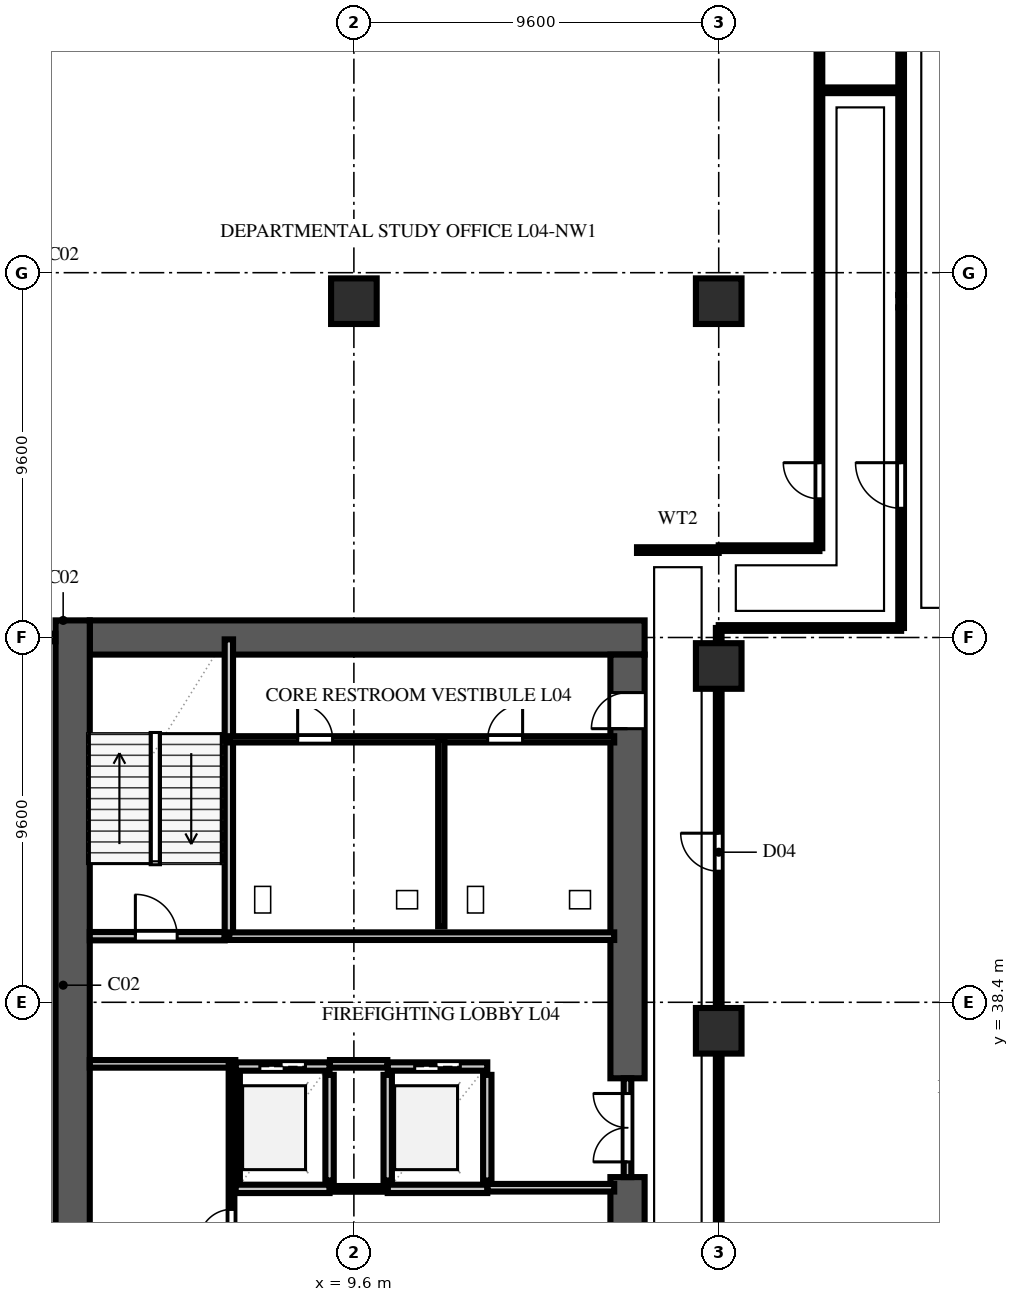
"""IFC4 building model, lengths in metres.
Left out: names, types, materials, properties, quantities, classifications, styles, units other than length and angle.
Written with IfcOpenShell. Run it as: python <this file> out.ifc"""

import sys

from ifc_helpers import new_model, si_unit, direction, frame, frame_2d, origin, origin_2d, place, context, subcontext, project, spatial, rectangle, extrude, element, fill, save


model = new_model("IFC4")
c1 = context("Model", 3, precision=1e-05, world=origin(), true_north=direction((0.0, 1.0)))
c2 = subcontext(c1, "Body", "Model", "MODEL_VIEW")
j1 = project(units=[si_unit("LENGTHUNIT", "METRE"), si_unit("PLANEANGLEUNIT", "RADIAN")], contexts=[c1])
p1 = place(None, origin())
s1 = spatial("IfcSite", under=j1, at=p1, CompositionType="ELEMENT")
p2 = place(p1, origin())
s2 = spatial("IfcBuilding", under=s1, at=p2, CompositionType="ELEMENT")
p3 = place(p2, frame((0.0, 0.0, 19.6)))
s3 = spatial("IfcBuildingStorey", under=s2, at=p3, CompositionType="ELEMENT", Elevation=19.6)
p4 = place(p3, frame((2.65, 48.0, 0.0), z_axis=(0.0, 0.0, 1.0), x_axis=(1.0, 0.0, 0.0)))
e1 = element("IfcWall", 1, at=p4, inside=s3, PredefinedType="SHEAR", context=c2, shape_type="SweptSolid", body=[
    extrude(rectangle(XDim=14.6, YDim=0.9, at=frame_2d((7.3, 0.0))), origin(), (0.0, 0.0, 1.0), 4.34),
])
p5 = place(p3, frame((2.2, 9.15, 0.0), z_axis=(0.0, 0.0, 1.0), x_axis=(0.0, 1.0, 0.0)))
e2 = element("IfcWall", 2, at=p5, inside=s3, PredefinedType="SHEAR", context=c2, shape_type="SweptSolid", body=[
    extrude(rectangle(XDim=39.3, YDim=0.9, at=frame_2d((19.65, 0.0))), origin(), (0.0, 0.0, 1.0), 4.34),
])
p6 = place(p3, frame((16.8, 26.0, 0.0), z_axis=(0.0, 0.0, 1.0), x_axis=(0.0, 1.0, 0.0)))
e3 = element("IfcWall", 3, at=p6, inside=s3, PredefinedType="SHEAR", context=c2, shape_type="SweptSolid", body=[
    extrude(rectangle(XDim=7.8, YDim=0.9, at=frame_2d((3.9, 0.0))), origin(), (0.0, 0.0, 1.0), 4.34),
])
p7 = place(p3, frame((16.8, 36.4, 0.0), z_axis=(0.0, 0.0, 1.0), x_axis=(0.0, 1.0, 0.0)))
e4 = element("IfcWall", 4, at=p7, inside=s3, PredefinedType="SHEAR", context=c2, shape_type="SweptSolid", body=[
    extrude(rectangle(XDim=11.15, YDim=0.9, at=frame_2d((5.575, 0.0))), origin(), (0.0, 0.0, 1.0), 4.34),
])
p8 = place(p7, frame((9.2, 0.0, 0.0)))
e5 = element("IfcOpeningElement", 5, at=p8, cuts=e4, PredefinedType="OPENING", context=c2, shape_type="SweptSolid", body=[
    extrude(rectangle(XDim=0.95, YDim=2.15, at=frame_2d((0.475, 1.075))), frame((0.0, 0.462, 0.0), z_axis=(0.0, -1.0, 0.0), x_axis=(1.0, 0.0, 0.0)), (0.0, 0.0, 1.0), 0.924),
])
for number, where, z_axis, x_axis in (
    (6, (9.6, 56.85, 0.0), (0.0, 0.0, 1.0), (1.0, 0.0, 0.0)),
    (7, (19.2, 37.65, 0.0), (0.0, 0.0, 1.0), (1.0, 0.0, 0.0)),
    (8, (19.2, 47.25, 0.0), (0.0, 0.0, 1.0), (1.0, 0.0, 0.0)),
    (9, (19.2, 56.85, 0.0), (0.0, 0.0, 1.0), (1.0, 0.0, 0.0)),
):
    element("IfcColumn", number, at=place(p3, frame(where, z_axis=z_axis, x_axis=x_axis)), inside=s3, PredefinedType="COLUMN", context=c2, shape_type="SweptSolid", body=[
        extrude(rectangle(XDim=1.2, YDim=1.2, at=origin_2d()), origin(), (0.0, 0.0, 1.0), 4.6),
    ])
p9 = place(p3, frame((2.65, 40.14, 0.0), z_axis=(0.0, 0.0, 1.0), x_axis=(1.0, 0.0, 0.0)))
e10 = element("IfcWall", 10, at=p9, inside=s3, PredefinedType="SOLIDWALL", context=c2, shape_type="SweptSolid", body=[
    extrude(rectangle(XDim=3.55, YDim=0.22, at=frame_2d((1.775, 0.0))), origin(), (0.0, 0.0, 1.0), 4.34),
])
p10 = place(p9, frame((1.2, 0.0, 0.0)))
e11 = element("IfcOpeningElement", 11, at=p10, cuts=e10, PredefinedType="OPENING", context=c2, shape_type="SweptSolid", body=[
    extrude(rectangle(XDim=1.1, YDim=2.2, at=frame_2d((0.55, 1.1))), frame((0.0, 0.122, 0.0), z_axis=(0.0, -1.0, 0.0), x_axis=(1.0, 0.0, 0.0)), (0.0, 0.0, 1.0), 0.244),
])
p11 = place(p3, frame((6.31, 40.14, 0.0), z_axis=(0.0, 0.0, 1.0), x_axis=(0.0, 1.0, 0.0)))
e12 = element("IfcWall", 12, at=p11, inside=s3, PredefinedType="SOLIDWALL", context=c2, shape_type="SweptSolid", body=[
    extrude(rectangle(XDim=7.81, YDim=0.22, at=frame_2d((3.905, 0.0))), origin(), (0.0, 0.0, 1.0), 4.34),
])
for number, where, z_axis, x_axis in (
    (13, (6.49, 33.71, 0.0), (0.0, 0.0, 1.0), (0.0, 1.0, 0.0)),
    (14, (8.96, 33.71, 0.0), (0.0, 0.0, 1.0), (0.0, 1.0, 0.0)),
):
    element("IfcWall", number, at=place(p3, frame(where, z_axis=z_axis, x_axis=x_axis)), inside=s3, PredefinedType="SOLIDWALL", context=c2, shape_type="SweptSolid", body=[
        extrude(rectangle(XDim=2.78, YDim=0.22, at=frame_2d((1.39, 0.0))), origin(), (0.0, 0.0, 1.0), 4.34),
    ])
p12 = place(p3, frame((6.49, 33.49, 0.0), z_axis=(0.0, 0.0, 1.0), x_axis=(1.0, 0.0, 0.0)))
e15 = element("IfcWall", 15, at=p12, inside=s3, PredefinedType="SOLIDWALL", context=c2, shape_type="SweptSolid", body=[
    extrude(rectangle(XDim=2.47, YDim=0.22, at=frame_2d((1.235, 0.0))), origin(), (0.0, 0.0, 1.0), 4.34),
])
p13 = place(p3, frame((6.49, 36.71, 0.0), z_axis=(0.0, 0.0, 1.0), x_axis=(1.0, 0.0, 0.0)))
e16 = element("IfcWall", 16, at=p13, inside=s3, PredefinedType="SOLIDWALL", context=c2, shape_type="SweptSolid", body=[
    extrude(rectangle(XDim=2.47, YDim=0.22, at=frame_2d((1.235, 0.0))), origin(), (0.0, 0.0, 1.0), 4.34),
])
p14 = place(p13, frame((0.635, 0.0, 0.0)))
e17 = element("IfcOpeningElement", 17, at=p14, cuts=e16, PredefinedType="OPENING", context=c2, shape_type="SweptSolid", body=[
    extrude(rectangle(XDim=1.2, YDim=2.2, at=frame_2d((0.6, 1.1))), frame((0.0, 0.122, 0.0), z_axis=(0.0, -1.0, 0.0), x_axis=(1.0, 0.0, 0.0)), (0.0, 0.0, 1.0), 0.244),
])
for number, where, z_axis, x_axis in (
    (18, (10.49, 33.71, 0.0), (0.0, 0.0, 1.0), (0.0, 1.0, 0.0)),
    (19, (13.11, 33.71, 0.0), (0.0, 0.0, 1.0), (0.0, 1.0, 0.0)),
):
    element("IfcWall", number, at=place(p3, frame(where, z_axis=z_axis, x_axis=x_axis)), inside=s3, PredefinedType="SOLIDWALL", context=c2, shape_type="SweptSolid", body=[
        extrude(rectangle(XDim=2.78, YDim=0.22, at=frame_2d((1.39, 0.0))), origin(), (0.0, 0.0, 1.0), 4.34),
    ])
p15 = place(p3, frame((10.49, 33.49, 0.0), z_axis=(0.0, 0.0, 1.0), x_axis=(1.0, 0.0, 0.0)))
e20 = element("IfcWall", 20, at=p15, inside=s3, PredefinedType="SOLIDWALL", context=c2, shape_type="SweptSolid", body=[
    extrude(rectangle(XDim=2.62, YDim=0.22, at=frame_2d((1.31, 0.0))), origin(), (0.0, 0.0, 1.0), 4.34),
])
p16 = place(p3, frame((10.49, 36.71, 0.0), z_axis=(0.0, 0.0, 1.0), x_axis=(1.0, 0.0, 0.0)))
e21 = element("IfcWall", 21, at=p16, inside=s3, PredefinedType="SOLIDWALL", context=c2, shape_type="SweptSolid", body=[
    extrude(rectangle(XDim=2.62, YDim=0.22, at=frame_2d((1.31, 0.0))), origin(), (0.0, 0.0, 1.0), 4.34),
])
p17 = place(p16, frame((0.71, 0.0, 0.0)))
e22 = element("IfcOpeningElement", 22, at=p17, cuts=e21, PredefinedType="OPENING", context=c2, shape_type="SweptSolid", body=[
    extrude(rectangle(XDim=1.2, YDim=2.2, at=frame_2d((0.6, 1.1))), frame((0.0, 0.122, 0.0), z_axis=(0.0, -1.0, 0.0), x_axis=(1.0, 0.0, 0.0)), (0.0, 0.0, 1.0), 0.244),
])
p18 = place(p3, frame((2.65, 36.78, 0.0), z_axis=(0.0, 0.0, 1.0), x_axis=(1.0, 0.0, 0.0)))
e23 = element("IfcWall", 23, at=p18, inside=s3, PredefinedType="SOLIDWALL", context=c2, shape_type="SweptSolid", body=[
    extrude(rectangle(XDim=3.83, YDim=0.2, at=frame_2d((1.915, 0.0))), origin(), (0.0, 0.0, 1.0), 4.34),
])
p19 = place(p3, frame((8.97, 36.78, 0.0), z_axis=(0.0, 0.0, 1.0), x_axis=(1.0, 0.0, 0.0)))
e24 = element("IfcWall", 24, at=p19, inside=s3, PredefinedType="SOLIDWALL", context=c2, shape_type="SweptSolid", body=[
    extrude(rectangle(XDim=1.51, YDim=0.2, at=frame_2d((0.755, 0.0))), origin(), (0.0, 0.0, 1.0), 4.34),
])
p20 = place(p3, frame((13.12, 33.52, 0.0), z_axis=(0.0, 0.0, 1.0), x_axis=(1.0, 0.0, 0.0)))
e25 = element("IfcWall", 25, at=p20, inside=s3, PredefinedType="SOLIDWALL", context=c2, shape_type="SweptSolid", body=[
    extrude(rectangle(XDim=3.33, YDim=0.2, at=frame_2d((1.665, 0.0))), origin(), (0.0, 0.0, 1.0), 4.34),
])
p21 = place(p3, frame((6.32, 40.14, 0.0), z_axis=(0.0, 0.0, 1.0), x_axis=(1.0, 0.0, 0.0)))
e26 = element("IfcWall", 26, at=p21, inside=s3, PredefinedType="SOLIDWALL", context=c2, shape_type="SweptSolid", body=[
    extrude(rectangle(XDim=10.13, YDim=0.2, at=frame_2d((5.065, 0.0))), origin(), (0.0, 0.0, 1.0), 4.34),
])
p22 = place(p3, frame((16.8, 33.8, 0.0), z_axis=(0.0, 0.0, 1.0), x_axis=(0.0, 1.0, 0.0)))
e27 = element("IfcWall", 27, at=p22, inside=s3, PredefinedType="SOLIDWALL", context=c2, shape_type="SweptSolid", body=[
    extrude(rectangle(XDim=2.6, YDim=0.2, at=frame_2d((1.3, 0.0))), origin(), (0.0, 0.0, 1.0), 4.34),
])
p23 = place(p22, frame((0.4, 0.0, 0.0)))
e28 = element("IfcOpeningElement", 28, at=p23, cuts=e27, PredefinedType="OPENING", context=c2, shape_type="SweptSolid", body=[
    extrude(rectangle(XDim=1.8, YDim=2.2, at=frame_2d((0.9, 1.1))), frame((0.0, 0.112, 0.0), z_axis=(0.0, -1.0, 0.0), x_axis=(1.0, 0.0, 0.0)), (0.0, 0.0, 1.0), 0.224),
])
p24 = place(p3, frame((8.965, 33.49, 0.0), z_axis=(0.0, 0.0, 1.0), x_axis=(1.0, 0.0, 0.0)))
e29 = element("IfcWall", 29, at=p24, inside=s3, PredefinedType="PARTITIONING", context=c2, shape_type="SweptSolid", body=[
    extrude(rectangle(XDim=1.52, YDim=0.15, at=frame_2d((0.76, 0.0))), origin(), (0.0, 0.0, 1.0), 4.34),
])
p25 = place(p3, frame((6.38, 17.8, 0.0), z_axis=(0.0, 0.0, 1.0), x_axis=(0.0, 1.0, 0.0)))
e30 = element("IfcWall", 30, at=p25, inside=s3, PredefinedType="PARTITIONING", context=c2, shape_type="SweptSolid", body=[
    extrude(rectangle(XDim=18.98, YDim=0.15, at=frame_2d((9.49, 0.0))), origin(), (0.0, 0.0, 1.0), 4.34),
])
p26 = place(p25, frame((14.3, 0.0, 0.0)))
e31 = element("IfcOpeningElement", 31, at=p26, cuts=e30, PredefinedType="OPENING", context=c2, shape_type="SweptSolid", body=[
    extrude(rectangle(XDim=0.85, YDim=2.1, at=frame_2d((0.425, 1.05))), frame((0.0, 0.087, 0.0), z_axis=(0.0, -1.0, 0.0), x_axis=(1.0, 0.0, 0.0)), (0.0, 0.0, 1.0), 0.174),
])
p27 = place(p3, frame((6.32, 45.32, 0.0), z_axis=(0.0, 0.0, 1.0), x_axis=(1.0, 0.0, 0.0)))
e32 = element("IfcWall", 32, at=p27, inside=s3, PredefinedType="PLUMBINGWALL", context=c2, shape_type="SweptSolid", body=[
    extrude(rectangle(XDim=10.13, YDim=0.165, at=frame_2d((5.065, 0.0))), origin(), (0.0, 0.0, 1.0), 4.34),
])
p28 = place(p27, frame((1.8, 0.0, 0.0)))
e33 = element("IfcOpeningElement", 33, at=p28, cuts=e32, PredefinedType="OPENING", context=c2, shape_type="SweptSolid", body=[
    extrude(rectangle(XDim=0.92, YDim=2.15, at=frame_2d((0.46, 1.075))), frame((0.0, 0.094, 0.0), z_axis=(0.0, -1.0, 0.0), x_axis=(1.0, 0.0, 0.0)), (0.0, 0.0, 1.0), 0.189),
])
p29 = place(p27, frame((6.8, 0.0, 0.0)))
e34 = element("IfcOpeningElement", 34, at=p29, cuts=e32, PredefinedType="OPENING", context=c2, shape_type="SweptSolid", body=[
    extrude(rectangle(XDim=0.92, YDim=2.15, at=frame_2d((0.46, 1.075))), frame((0.0, 0.094, 0.0), z_axis=(0.0, -1.0, 0.0), x_axis=(1.0, 0.0, 0.0)), (0.0, 0.0, 1.0), 0.189),
])
p30 = place(p3, frame((11.9, 40.4, 0.0), z_axis=(0.0, 0.0, 1.0), x_axis=(0.0, 1.0, 0.0)))
e35 = element("IfcWall", 35, at=p30, inside=s3, PredefinedType="PLUMBINGWALL", context=c2, shape_type="SweptSolid", body=[
    extrude(rectangle(XDim=4.92, YDim=0.165, at=frame_2d((2.46, 0.0))), origin(), (0.0, 0.0, 1.0), 4.34),
])
p31 = place(p3, frame((0.85, 48.0, 0.0), z_axis=(0.0, 0.0, 1.0), x_axis=(1.0, 0.0, 0.0)))
e36 = element("IfcWall", 36, at=p31, inside=s3, PredefinedType="SOLIDWALL", context=c2, shape_type="SweptSolid", body=[
    extrude(rectangle(XDim=0.895, YDim=0.2, at=frame_2d((0.448, 0.0))), origin(), (0.0, 0.0, 1.0), 4.34),
])
p32 = place(p3, frame((17.05, 50.3, 0.0), z_axis=(0.0, 0.0, 1.0), x_axis=(1.0, 0.0, 0.0)))
e37 = element("IfcWall", 37, at=p32, inside=s3, PredefinedType="PARTITIONING", context=c2, shape_type="SweptSolid", body=[
    extrude(rectangle(XDim=2.15, YDim=0.15, at=frame_2d((1.075, 0.0))), origin(), (0.0, 0.0, 1.0), 4.34),
])
p33 = place(p3, frame((19.2, 26.25, 0.0), z_axis=(0.0, 0.0, 1.0), x_axis=(0.0, 1.0, 0.0)))
e38 = element("IfcWall", 38, at=p33, inside=s3, PredefinedType="PARTITIONING", context=c2, shape_type="SweptSolid", body=[
    extrude(rectangle(XDim=22.0, YDim=0.15, at=frame_2d((11.0, 0.0))), origin(), (0.0, 0.0, 1.0), 3.724),
])
p34 = place(p33, frame((15.6, 0.0, 0.0)))
e39 = element("IfcOpeningElement", 39, at=p34, cuts=e38, PredefinedType="OPENING", context=c2, shape_type="SweptSolid", body=[
    extrude(rectangle(XDim=1.0, YDim=2.2, at=frame_2d((0.5, 1.1))), frame((0.0, 0.087, 0.0), z_axis=(0.0, -1.0, 0.0), x_axis=(1.0, 0.0, 0.0)), (0.0, 0.0, 1.0), 0.174),
])
p35 = place(p3, frame((19.2, 48.25, 0.0), z_axis=(0.0, 0.0, 1.0), x_axis=(1.0, 0.0, 0.0)))
e40 = element("IfcWall", 40, at=p35, inside=s3, PredefinedType="PARTITIONING", context=c2, shape_type="SweptSolid", body=[
    extrude(rectangle(XDim=4.8, YDim=0.15, at=frame_2d((2.4, 0.0))), origin(), (0.0, 0.0, 1.0), 4.34),
])
p36 = place(p3, frame((19.2, 50.35, 0.0), z_axis=(0.0, 0.0, 1.0), x_axis=(1.0, 0.0, 0.0)))
e41 = element("IfcWall", 41, at=p36, inside=s3, PredefinedType="PARTITIONING", context=c2, shape_type="SweptSolid", body=[
    extrude(rectangle(XDim=2.65, YDim=0.15, at=frame_2d((1.325, 0.0))), origin(), (0.0, 0.0, 1.0), 4.34),
])
p37 = place(p3, frame((21.85, 62.4, 0.0), z_axis=(0.0, 0.0, 1.0), x_axis=(1.0, 0.0, 0.0)))
e42 = element("IfcWall", 42, at=p37, inside=s3, PredefinedType="PARTITIONING", context=c2, shape_type="SweptSolid", body=[
    extrude(rectangle(XDim=2.15, YDim=0.15, at=frame_2d((1.075, 0.0))), origin(), (0.0, 0.0, 1.0), 4.34),
])
p38 = place(p3, frame((24.0, 48.25, 0.0), z_axis=(0.0, 0.0, 1.0), x_axis=(0.0, 1.0, 0.0)))
e43 = element("IfcWall", 43, at=p38, inside=s3, PredefinedType="PARTITIONING", context=c2, shape_type="SweptSolid", body=[
    extrude(rectangle(XDim=8.438, YDim=0.15, at=frame_2d((4.219, 0.0))), origin(), (0.0, 0.0, 1.0), 3.796),
])
p39 = place(p38, frame((3.15, 0.0, 0.0)))
e44 = element("IfcOpeningElement", 44, at=p39, cuts=e43, PredefinedType="OPENING", context=c2, shape_type="SweptSolid", body=[
    extrude(rectangle(XDim=1.2, YDim=2.2, at=frame_2d((0.6, 1.1))), frame((0.0, 0.087, 0.0), z_axis=(0.0, -1.0, 0.0), x_axis=(1.0, 0.0, 0.0)), (0.0, 0.0, 1.0), 0.174),
])
p40 = place(p3, frame((24.0, 56.688, 0.0), z_axis=(0.0, 0.0, 1.0), x_axis=(0.0, 1.0, 0.0)))
e45 = element("IfcWall", 45, at=p40, inside=s3, PredefinedType="PARTITIONING", context=c2, shape_type="SweptSolid", body=[
    extrude(rectangle(XDim=0.325, YDim=0.15, at=frame_2d((0.163, 0.0))), origin(), (0.0, 0.0, 1.0), 4.34),
])
p41 = place(p3, frame((24.0, 57.012, 0.0), z_axis=(0.0, 0.0, 1.0), x_axis=(0.0, 1.0, 0.0)))
e46 = element("IfcWall", 46, at=p41, inside=s3, PredefinedType="PARTITIONING", context=c2, shape_type="SweptSolid", body=[
    extrude(rectangle(XDim=9.275, YDim=0.15, at=frame_2d((4.638, 0.0))), origin(), (0.0, 0.0, 1.0), 3.796),
])
p42 = place(p3, frame((21.85, 50.35, 0.0), z_axis=(0.0, 0.0, 1.0), x_axis=(0.0, 1.0, 0.0)))
e47 = element("IfcWall", 47, at=p42, inside=s3, PredefinedType="PARTITIONING", context=c2, shape_type="SweptSolid", body=[
    extrude(rectangle(XDim=16.63, YDim=0.15, at=frame_2d((8.315, 0.0))), origin(), (0.0, 0.0, 1.0), 4.34),
])
p43 = place(p42, frame((1.3, 0.0, 0.0)))
e48 = element("IfcOpeningElement", 48, at=p43, cuts=e47, PredefinedType="OPENING", context=c2, shape_type="SweptSolid", body=[
    extrude(rectangle(XDim=0.95, YDim=2.15, at=frame_2d((0.475, 1.075))), frame((0.0, 0.087, 0.0), z_axis=(0.0, -1.0, 0.0), x_axis=(1.0, 0.0, 0.0)), (0.0, 0.0, 1.0), 0.174),
])
p44 = place(p10, origin())
e49 = element("IfcDoor", 49, at=p44, inside=s3, OperationType="SINGLE_SWING_LEFT", PredefinedType="DOOR", context=c2, shape_type="SweptSolid", body=[
    extrude(rectangle(XDim=1.1, YDim=2.2, at=frame_2d((0.55, 1.1))), frame((0.0, 0.025, 0.0), z_axis=(0.0, -1.0, 0.0), x_axis=(1.0, 0.0, 0.0)), (0.0, 0.0, 1.0), 0.05),
])
fill(e11, e49)
p45 = place(p14, origin())
e50 = element("IfcDoor", 50, at=p45, inside=s3, OperationType="DOUBLE_DOOR_SLIDING", PredefinedType="DOOR", context=c2, shape_type="SweptSolid", body=[
    extrude(rectangle(XDim=1.2, YDim=2.2, at=frame_2d((0.6, 1.1))), frame((0.0, 0.025, 0.0), z_axis=(0.0, -1.0, 0.0), x_axis=(1.0, 0.0, 0.0)), (0.0, 0.0, 1.0), 0.05),
])
fill(e17, e50)
p46 = place(p17, origin())
e51 = element("IfcDoor", 51, at=p46, inside=s3, OperationType="DOUBLE_DOOR_SLIDING", PredefinedType="DOOR", context=c2, shape_type="SweptSolid", body=[
    extrude(rectangle(XDim=1.2, YDim=2.2, at=frame_2d((0.6, 1.1))), frame((0.0, 0.025, 0.0), z_axis=(0.0, -1.0, 0.0), x_axis=(1.0, 0.0, 0.0)), (0.0, 0.0, 1.0), 0.05),
])
fill(e22, e51)
p47 = place(p8, origin())
e52 = element("IfcDoor", 52, at=p47, inside=s3, OperationType="SINGLE_SWING_LEFT", PredefinedType="DOOR", context=c2, shape_type="SweptSolid", body=[
    extrude(rectangle(XDim=0.95, YDim=2.15, at=frame_2d((0.475, 1.075))), frame((0.0, 0.025, 0.0), z_axis=(0.0, -1.0, 0.0), x_axis=(1.0, 0.0, 0.0)), (0.0, 0.0, 1.0), 0.05),
])
fill(e5, e52)
p48 = place(p23, origin())
e53 = element("IfcDoor", 53, at=p48, inside=s3, OperationType="DOUBLE_DOOR_SINGLE_SWING", PredefinedType="DOOR", context=c2, shape_type="SweptSolid", body=[
    extrude(rectangle(XDim=1.8, YDim=2.2, at=frame_2d((0.9, 1.1))), frame((0.0, 0.025, 0.0), z_axis=(0.0, -1.0, 0.0), x_axis=(1.0, 0.0, 0.0)), (0.0, 0.0, 1.0), 0.05),
])
fill(e28, e53)
p49 = place(p26, origin())
e54 = element("IfcDoor", 54, at=p49, inside=s3, OperationType="SINGLE_SWING_LEFT", PredefinedType="DOOR", context=c2, shape_type="SweptSolid", body=[
    extrude(rectangle(XDim=0.85, YDim=2.1, at=frame_2d((0.425, 1.05))), frame((0.0, 0.025, 0.0), z_axis=(0.0, -1.0, 0.0), x_axis=(1.0, 0.0, 0.0)), (0.0, 0.0, 1.0), 0.05),
])
fill(e31, e54)
p50 = place(p28, origin())
e55 = element("IfcDoor", 55, at=p50, inside=s3, OperationType="SINGLE_SWING_LEFT", PredefinedType="DOOR", context=c2, shape_type="SweptSolid", body=[
    extrude(rectangle(XDim=0.92, YDim=2.15, at=frame_2d((0.46, 1.075))), frame((0.0, 0.025, 0.0), z_axis=(0.0, -1.0, 0.0), x_axis=(1.0, 0.0, 0.0)), (0.0, 0.0, 1.0), 0.05),
])
fill(e33, e55)
p51 = place(p29, origin())
e56 = element("IfcDoor", 56, at=p51, inside=s3, OperationType="SINGLE_SWING_RIGHT", PredefinedType="DOOR", context=c2, shape_type="SweptSolid", body=[
    extrude(rectangle(XDim=0.92, YDim=2.15, at=frame_2d((0.46, 1.075))), frame((0.0, 0.025, 0.0), z_axis=(0.0, -1.0, 0.0), x_axis=(1.0, 0.0, 0.0)), (0.0, 0.0, 1.0), 0.05),
])
fill(e34, e56)
p52 = place(p34, origin())
e57 = element("IfcDoor", 57, at=p52, inside=s3, OperationType="SINGLE_SWING_RIGHT", PredefinedType="DOOR", context=c2, shape_type="SweptSolid", body=[
    extrude(rectangle(XDim=1.0, YDim=2.2, at=frame_2d((0.5, 1.1))), frame((0.0, 0.025, 0.0), z_axis=(0.0, -1.0, 0.0), x_axis=(1.0, 0.0, 0.0)), (0.0, 0.0, 1.0), 0.05),
])
fill(e39, e57)
p53 = place(p39, origin())
e58 = element("IfcDoor", 58, at=p53, inside=s3, OperationType="SINGLE_SWING_RIGHT", PredefinedType="DOOR", context=c2, shape_type="SweptSolid", body=[
    extrude(rectangle(XDim=1.2, YDim=2.2, at=frame_2d((0.6, 1.1))), frame((0.0, 0.025, 0.0), z_axis=(0.0, -1.0, 0.0), x_axis=(1.0, 0.0, 0.0)), (0.0, 0.0, 1.0), 0.05),
])
fill(e44, e58)
p54 = place(p43, origin())
e59 = element("IfcDoor", 59, at=p54, inside=s3, OperationType="SINGLE_SWING_RIGHT", PredefinedType="DOOR", context=c2, shape_type="SweptSolid", body=[
    extrude(rectangle(XDim=0.95, YDim=2.15, at=frame_2d((0.475, 1.075))), frame((0.0, 0.025, 0.0), z_axis=(0.0, -1.0, 0.0), x_axis=(1.0, 0.0, 0.0)), (0.0, 0.0, 1.0), 0.05),
])
fill(e48, e59)
save(model, sys.argv[1])
